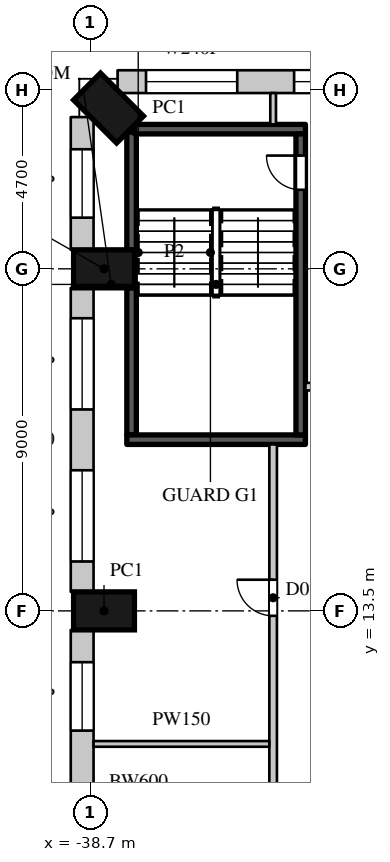
"""IFC4 building model, lengths in metres.
Left out: names, types, materials, properties, quantities, classifications, styles, units other than length and angle.
Written with IfcOpenShell. Run it as: python <this file> out.ifc"""

import sys

from ifc_helpers import new_model, si_unit, direction, frame, frame_2d, origin, origin_2d, place, context, subcontext, project, spatial, rectangle, extrude, element, fill, save


model = new_model("IFC4")
c1 = context("Model", 3, precision=1e-05, world=origin(), true_north=direction((0.0, 1.0)))
c2 = subcontext(c1, "Body", "Model", "MODEL_VIEW")
j1 = project(units=[si_unit("LENGTHUNIT", "METRE"), si_unit("PLANEANGLEUNIT", "RADIAN")], contexts=[c1])
p1 = place(None, origin())
s1 = spatial("IfcSite", under=j1, at=p1, CompositionType="ELEMENT")
p2 = place(p1, origin())
s2 = spatial("IfcBuilding", under=s1, at=p2, CompositionType="ELEMENT")
p3 = place(p2, frame((0.0, 0.0, 44.0)))
s3 = spatial("IfcBuildingStorey", under=s2, at=p3, CompositionType="ELEMENT", Elevation=44.0)
for number, where, z_axis, x_axis in (
    (1, (-38.231, 26.731, 0.0), (0.0, 0.0, 1.0), (-0.707, -0.707, 0.0)),
    (2, (-38.35, 22.5, 0.0), (0.0, 0.0, 1.0), (0.0, -1.0, 0.0)),
    (3, (-38.35, 13.5, 0.0), (0.0, 0.0, 1.0), (0.0, -1.0, 0.0)),
):
    element("IfcColumn", number, at=place(p3, frame(where, z_axis=z_axis, x_axis=x_axis)), inside=s3, PredefinedType="COLUMN", context=c2, shape_type="SweptSolid", body=[
        extrude(rectangle(XDim=1.0, YDim=1.6, at=origin_2d()), origin(), (0.0, 0.0, 1.0), 6.0),
    ])
p4 = place(p3, frame((-30.2, 27.425, 0.0), z_axis=(0.0, 0.0, 1.0), x_axis=(-1.0, 0.0, 0.0)))
e4 = element("IfcWall", 4, at=p4, inside=s3, PredefinedType="ELEMENTEDWALL", context=c2, shape_type="SweptSolid", body=[
    extrude(rectangle(XDim=7.793, YDim=0.6, at=frame_2d((3.896, 0.0))), origin(), (0.0, 0.0, 1.0), 5.596),
])
p5 = place(p4, frame((0.748, 0.0, 1.2)))
e5 = element("IfcOpeningElement", 5, at=p5, cuts=e4, PredefinedType="OPENING", context=c2, shape_type="SweptSolid", body=[
    extrude(rectangle(XDim=2.4, YDim=2.4, at=frame_2d((1.2, 1.2))), frame((0.0, 0.31, 0.0), z_axis=(0.0, -1.0, 0.0), x_axis=(1.0, 0.0, 0.0)), (0.0, 0.0, 1.0), 0.62),
])
p6 = place(p4, frame((4.645, 0.0, 1.2)))
e6 = element("IfcOpeningElement", 6, at=p6, cuts=e4, PredefinedType="OPENING", context=c2, shape_type="SweptSolid", body=[
    extrude(rectangle(XDim=2.4, YDim=2.4, at=frame_2d((1.2, 1.2))), frame((0.0, 0.31, 0.0), z_axis=(0.0, -1.0, 0.0), x_axis=(1.0, 0.0, 0.0)), (0.0, 0.0, 1.0), 0.62),
])
p7 = place(p3, frame((-38.925, 26.493, 0.0), z_axis=(0.0, 0.0, 1.0), x_axis=(0.0, -1.0, 0.0)))
e7 = element("IfcWall", 7, at=p7, inside=s3, PredefinedType="ELEMENTEDWALL", context=c2, shape_type="SweptSolid", body=[
    extrude(rectangle(XDim=3.493, YDim=0.6, at=frame_2d((1.747, 0.0))), origin(), (0.0, 0.0, 1.0), 5.596),
])
p8 = place(p7, frame((0.846, 0.0, 1.2)))
e8 = element("IfcOpeningElement", 8, at=p8, cuts=e7, PredefinedType="OPENING", context=c2, shape_type="SweptSolid", body=[
    extrude(rectangle(XDim=1.8, YDim=2.4, at=frame_2d((0.9, 1.2))), frame((0.0, 0.31, 0.0), z_axis=(0.0, -1.0, 0.0), x_axis=(1.0, 0.0, 0.0)), (0.0, 0.0, 1.0), 0.62),
])
p9 = place(p3, frame((-38.925, 22.0, 0.0), z_axis=(0.0, 0.0, 1.0), x_axis=(0.0, -1.0, 0.0)))
e9 = element("IfcWall", 9, at=p9, inside=s3, PredefinedType="ELEMENTEDWALL", context=c2, shape_type="SweptSolid", body=[
    extrude(rectangle(XDim=8.0, YDim=0.6, at=frame_2d((4.0, 0.0))), origin(), (0.0, 0.0, 1.0), 5.596),
])
p10 = place(p9, frame((0.8, 0.0, 1.2)))
e10 = element("IfcOpeningElement", 10, at=p10, cuts=e9, PredefinedType="OPENING", context=c2, shape_type="SweptSolid", body=[
    extrude(rectangle(XDim=2.4, YDim=2.4, at=frame_2d((1.2, 1.2))), frame((0.0, 0.31, 0.0), z_axis=(0.0, -1.0, 0.0), x_axis=(1.0, 0.0, 0.0)), (0.0, 0.0, 1.0), 0.62),
])
p11 = place(p9, frame((4.8, 0.0, 1.2)))
e11 = element("IfcOpeningElement", 11, at=p11, cuts=e9, PredefinedType="OPENING", context=c2, shape_type="SweptSolid", body=[
    extrude(rectangle(XDim=2.4, YDim=2.4, at=frame_2d((1.2, 1.2))), frame((0.0, 0.31, 0.0), z_axis=(0.0, -1.0, 0.0), x_axis=(1.0, 0.0, 0.0)), (0.0, 0.0, 1.0), 0.62),
])
p12 = place(p3, frame((-38.925, 13.0, 0.0), z_axis=(0.0, 0.0, 1.0), x_axis=(0.0, -1.0, 0.0)))
e12 = element("IfcWall", 12, at=p12, inside=s3, PredefinedType="ELEMENTEDWALL", context=c2, shape_type="SweptSolid", body=[
    extrude(rectangle(XDim=8.0, YDim=0.6, at=frame_2d((4.0, 0.0))), origin(), (0.0, 0.0, 1.0), 5.596),
])
p13 = place(p12, frame((4.8, 0.0, 1.2)))
e13 = element("IfcOpeningElement", 13, at=p13, cuts=e12, PredefinedType="OPENING", context=c2, shape_type="SweptSolid", body=[
    extrude(rectangle(XDim=2.4, YDim=2.4, at=frame_2d((1.2, 1.2))), frame((0.0, 0.31, 0.0), z_axis=(0.0, -1.0, 0.0), x_axis=(1.0, 0.0, 0.0)), (0.0, 0.0, 1.0), 0.62),
])
p14 = place(p12, frame((0.85, 0.0, 1.2)))
e14 = element("IfcOpeningElement", 14, at=p14, cuts=e12, PredefinedType="OPENING", context=c2, shape_type="SweptSolid", body=[
    extrude(rectangle(XDim=1.8, YDim=2.4, at=frame_2d((0.9, 1.2))), frame((0.0, 0.31, 0.0), z_axis=(0.0, -1.0, 0.0), x_axis=(1.0, 0.0, 0.0)), (0.0, 0.0, 1.0), 0.62),
])
p15 = place(p3, frame((-33.9, -17.88, 0.0), z_axis=(0.0, 0.0, 1.0), x_axis=(0.0, 1.0, 0.0)))
e15 = element("IfcWall", 15, at=p15, inside=s3, PredefinedType="PARTITIONING", context=c2, shape_type="SweptSolid", body=[
    extrude(rectangle(XDim=35.76, YDim=0.2, at=frame_2d((17.88, 0.0))), origin(), (0.0, 0.0, 1.0), 5.596),
])
p16 = place(p15, frame((1.05, 0.0, 0.0)))
e16 = element("IfcOpeningElement", 16, at=p16, cuts=e15, PredefinedType="OPENING", context=c2, shape_type="SweptSolid", body=[
    extrude(rectangle(XDim=0.9, YDim=2.2, at=frame_2d((0.45, 1.1))), frame((0.0, 0.11, 0.0), z_axis=(0.0, -1.0, 0.0), x_axis=(1.0, 0.0, 0.0)), (0.0, 0.0, 1.0), 0.22),
])
p17 = place(p15, frame((4.9, 0.0, 0.0)))
e17 = element("IfcOpeningElement", 17, at=p17, cuts=e15, PredefinedType="OPENING", context=c2, shape_type="SweptSolid", body=[
    extrude(rectangle(XDim=0.9, YDim=2.2, at=frame_2d((0.45, 1.1))), frame((0.0, 0.11, 0.0), z_axis=(0.0, -1.0, 0.0), x_axis=(1.0, 0.0, 0.0)), (0.0, 0.0, 1.0), 0.22),
])
p18 = place(p15, frame((8.9, 0.0, 0.0)))
e18 = element("IfcOpeningElement", 18, at=p18, cuts=e15, PredefinedType="OPENING", context=c2, shape_type="SweptSolid", body=[
    extrude(rectangle(XDim=0.9, YDim=2.2, at=frame_2d((0.45, 1.1))), frame((0.0, 0.11, 0.0), z_axis=(0.0, -1.0, 0.0), x_axis=(1.0, 0.0, 0.0)), (0.0, 0.0, 1.0), 0.22),
])
p19 = place(p15, frame((12.9, 0.0, 0.0)))
e19 = element("IfcOpeningElement", 19, at=p19, cuts=e15, PredefinedType="OPENING", context=c2, shape_type="SweptSolid", body=[
    extrude(rectangle(XDim=0.95, YDim=2.2, at=frame_2d((0.475, 1.1))), frame((0.0, 0.11, 0.0), z_axis=(0.0, -1.0, 0.0), x_axis=(1.0, 0.0, 0.0)), (0.0, 0.0, 1.0), 0.22),
])
p20 = place(p15, frame((21.4, 0.0, 0.0)))
e20 = element("IfcOpeningElement", 20, at=p20, cuts=e15, PredefinedType="OPENING", context=c2, shape_type="SweptSolid", body=[
    extrude(rectangle(XDim=0.95, YDim=2.2, at=frame_2d((0.475, 1.1))), frame((0.0, 0.11, 0.0), z_axis=(0.0, -1.0, 0.0), x_axis=(1.0, 0.0, 0.0)), (0.0, 0.0, 1.0), 0.22),
])
p21 = place(p15, frame((31.25, 0.0, 0.0)))
e21 = element("IfcOpeningElement", 21, at=p21, cuts=e15, PredefinedType="OPENING", context=c2, shape_type="SweptSolid", body=[
    extrude(rectangle(XDim=0.95, YDim=2.2, at=frame_2d((0.475, 1.1))), frame((0.0, 0.11, 0.0), z_axis=(0.0, -1.0, 0.0), x_axis=(1.0, 0.0, 0.0)), (0.0, 0.0, 1.0), 0.22),
])
p22 = place(p3, frame((-33.05, 19.4, 0.0), z_axis=(0.0, 0.0, 1.0), x_axis=(1.0, 0.0, 0.0)))
e22 = element("IfcWall", 22, at=p22, inside=s3, PredefinedType="PARTITIONING", context=c2, shape_type="SweptSolid", body=[
    extrude(rectangle(XDim=2.913, YDim=0.2, at=frame_2d((1.457, 0.0))), origin(), (0.0, 0.0, 1.0), 5.596),
])
p23 = place(p22, frame((0.95, 0.0, 0.0)))
e23 = element("IfcOpeningElement", 23, at=p23, cuts=e22, PredefinedType="OPENING", context=c2, shape_type="SweptSolid", body=[
    extrude(rectangle(XDim=0.95, YDim=2.2, at=frame_2d((0.475, 1.1))), frame((0.0, 0.11, 0.0), z_axis=(0.0, -1.0, 0.0), x_axis=(1.0, 0.0, 0.0)), (0.0, 0.0, 1.0), 0.22),
])
p24 = place(p3, frame((-38.625, 10.0, 0.0), z_axis=(0.0, 0.0, 1.0), x_axis=(1.0, 0.0, 0.0)))
e24 = element("IfcWall", 24, at=p24, inside=s3, PredefinedType="PARTITIONING", context=c2, shape_type="SweptSolid", body=[
    extrude(rectangle(XDim=4.625, YDim=0.15, at=frame_2d((2.312, 0.0))), origin(), (0.0, 0.0, 1.0), 5.596),
])
p25 = place(p3, frame((-33.9, 26.3, 0.0), z_axis=(0.0, 0.0, 1.0), x_axis=(0.0, 1.0, 0.0)))
e25 = element("IfcWall", 25, at=p25, inside=s3, PredefinedType="PARTITIONING", context=c2, shape_type="SweptSolid", body=[
    extrude(rectangle(XDim=0.825, YDim=0.15, at=frame_2d((0.413, 0.0))), origin(), (0.0, 0.0, 1.0), 5.596),
])
p26 = place(p3, frame((-37.625, 18.13, 0.0), z_axis=(0.0, 0.0, 1.0), x_axis=(0.0, 1.0, 0.0)))
e26 = element("IfcWall", 26, at=p26, inside=s3, PredefinedType="SHEAR", context=c2, shape_type="SweptSolid", body=[
    extrude(rectangle(XDim=3.87, YDim=0.25, at=frame_2d((1.935, 0.0))), origin(), (0.0, 0.0, 1.0), 5.596),
])
p27 = place(p3, frame((-37.625, 23.0, 0.0), z_axis=(0.0, 0.0, 1.0), x_axis=(0.0, 1.0, 0.0)))
e27 = element("IfcWall", 27, at=p27, inside=s3, PredefinedType="SHEAR", context=c2, shape_type="SweptSolid", body=[
    extrude(rectangle(XDim=3.095, YDim=0.25, at=frame_2d((1.548, 0.0))), origin(), (0.0, 0.0, 1.0), 5.596),
])
p28 = place(p3, frame((-37.75, 18.005, 0.0), z_axis=(0.0, 0.0, 1.0), x_axis=(1.0, 0.0, 0.0)))
e28 = element("IfcWall", 28, at=p28, inside=s3, PredefinedType="SHEAR", context=c2, shape_type="SweptSolid", body=[
    extrude(rectangle(XDim=4.7, YDim=0.25, at=frame_2d((2.35, 0.0))), origin(), (0.0, 0.0, 1.0), 5.596),
])
p29 = place(p3, frame((-37.545, 26.175, 0.0), z_axis=(0.0, 0.0, 1.0), x_axis=(1.0, 0.0, 0.0)))
e29 = element("IfcWall", 29, at=p29, inside=s3, PredefinedType="SHEAR", context=c2, shape_type="SweptSolid", body=[
    extrude(rectangle(XDim=4.495, YDim=0.25, at=frame_2d((2.248, 0.0))), origin(), (0.0, 0.0, 1.0), 5.596),
])
p30 = place(p3, frame((-33.175, 18.13, 0.0), z_axis=(0.0, 0.0, 1.0), x_axis=(0.0, 1.0, 0.0)))
e30 = element("IfcWall", 30, at=p30, inside=s3, PredefinedType="SHEAR", context=c2, shape_type="SweptSolid", body=[
    extrude(rectangle(XDim=7.92, YDim=0.25, at=frame_2d((3.96, 0.0))), origin(), (0.0, 0.0, 1.0), 5.596),
])
p31 = place(p30, frame((6.45, 0.0, 0.0)))
e31 = element("IfcOpeningElement", 31, at=p31, cuts=e30, PredefinedType="OPENING", context=c2, shape_type="SweptSolid", body=[
    extrude(rectangle(XDim=0.9, YDim=2.2, at=frame_2d((0.45, 1.1))), frame((0.0, 0.135, 0.0), z_axis=(0.0, -1.0, 0.0), x_axis=(1.0, 0.0, 0.0)), (0.0, 0.0, 1.0), 0.27),
])
p32 = place(p5, origin())
e32 = element("IfcWindow", 32, at=p32, inside=s3, PartitioningType="SINGLE_PANEL", PredefinedType="WINDOW", context=c2, shape_type="SweptSolid", body=[
    extrude(rectangle(XDim=2.4, YDim=2.4, at=frame_2d((1.2, 1.2))), frame((0.0, 0.06, 0.0), z_axis=(0.0, -1.0, 0.0), x_axis=(1.0, 0.0, 0.0)), (0.0, 0.0, 1.0), 0.06),
])
fill(e5, e32)
p33 = place(p6, origin())
e33 = element("IfcWindow", 33, at=p33, inside=s3, PartitioningType="SINGLE_PANEL", PredefinedType="WINDOW", context=c2, shape_type="SweptSolid", body=[
    extrude(rectangle(XDim=2.4, YDim=2.4, at=frame_2d((1.2, 1.2))), frame((0.0, 0.06, 0.0), z_axis=(0.0, -1.0, 0.0), x_axis=(1.0, 0.0, 0.0)), (0.0, 0.0, 1.0), 0.06),
])
fill(e6, e33)
p34 = place(p8, origin())
e34 = element("IfcWindow", 34, at=p34, inside=s3, PartitioningType="SINGLE_PANEL", PredefinedType="WINDOW", context=c2, shape_type="SweptSolid", body=[
    extrude(rectangle(XDim=1.8, YDim=2.4, at=frame_2d((0.9, 1.2))), frame((0.0, 0.06, 0.0), z_axis=(0.0, -1.0, 0.0), x_axis=(1.0, 0.0, 0.0)), (0.0, 0.0, 1.0), 0.06),
])
fill(e8, e34)
p35 = place(p10, origin())
e35 = element("IfcWindow", 35, at=p35, inside=s3, PartitioningType="SINGLE_PANEL", PredefinedType="WINDOW", context=c2, shape_type="SweptSolid", body=[
    extrude(rectangle(XDim=2.4, YDim=2.4, at=frame_2d((1.2, 1.2))), frame((0.0, 0.06, 0.0), z_axis=(0.0, -1.0, 0.0), x_axis=(1.0, 0.0, 0.0)), (0.0, 0.0, 1.0), 0.06),
])
fill(e10, e35)
p36 = place(p11, origin())
e36 = element("IfcWindow", 36, at=p36, inside=s3, PartitioningType="SINGLE_PANEL", PredefinedType="WINDOW", context=c2, shape_type="SweptSolid", body=[
    extrude(rectangle(XDim=2.4, YDim=2.4, at=frame_2d((1.2, 1.2))), frame((0.0, 0.06, 0.0), z_axis=(0.0, -1.0, 0.0), x_axis=(1.0, 0.0, 0.0)), (0.0, 0.0, 1.0), 0.06),
])
fill(e11, e36)
p37 = place(p21, origin())
e37 = element("IfcDoor", 37, at=p37, inside=s3, OperationType="SINGLE_SWING_RIGHT", PredefinedType="DOOR", context=c2, shape_type="SweptSolid", body=[
    extrude(rectangle(XDim=0.95, YDim=2.2, at=frame_2d((0.475, 1.1))), frame((0.0, 0.025, 0.0), z_axis=(0.0, -1.0, 0.0), x_axis=(1.0, 0.0, 0.0)), (0.0, 0.0, 1.0), 0.05),
])
fill(e21, e37)
p38 = place(p31, origin())
e38 = element("IfcDoor", 38, at=p38, inside=s3, OperationType="SINGLE_SWING_RIGHT", PredefinedType="DOOR", context=c2, shape_type="SweptSolid", body=[
    extrude(rectangle(XDim=0.9, YDim=2.2, at=frame_2d((0.45, 1.1))), frame((0.0, 0.025, 0.0), z_axis=(0.0, -1.0, 0.0), x_axis=(1.0, 0.0, 0.0)), (0.0, 0.0, 1.0), 0.05),
])
fill(e31, e38)
p39 = place(p14, origin())
e39 = element("IfcWindow", 39, at=p39, inside=s3, PartitioningType="SINGLE_PANEL", PredefinedType="WINDOW", context=c2, shape_type="SweptSolid", body=[
    extrude(rectangle(XDim=1.8, YDim=2.4, at=frame_2d((0.9, 1.2))), frame((0.0, 0.06, 0.0), z_axis=(0.0, -1.0, 0.0), x_axis=(1.0, 0.0, 0.0)), (0.0, 0.0, 1.0), 0.06),
])
fill(e14, e39)
save(model, sys.argv[1])
